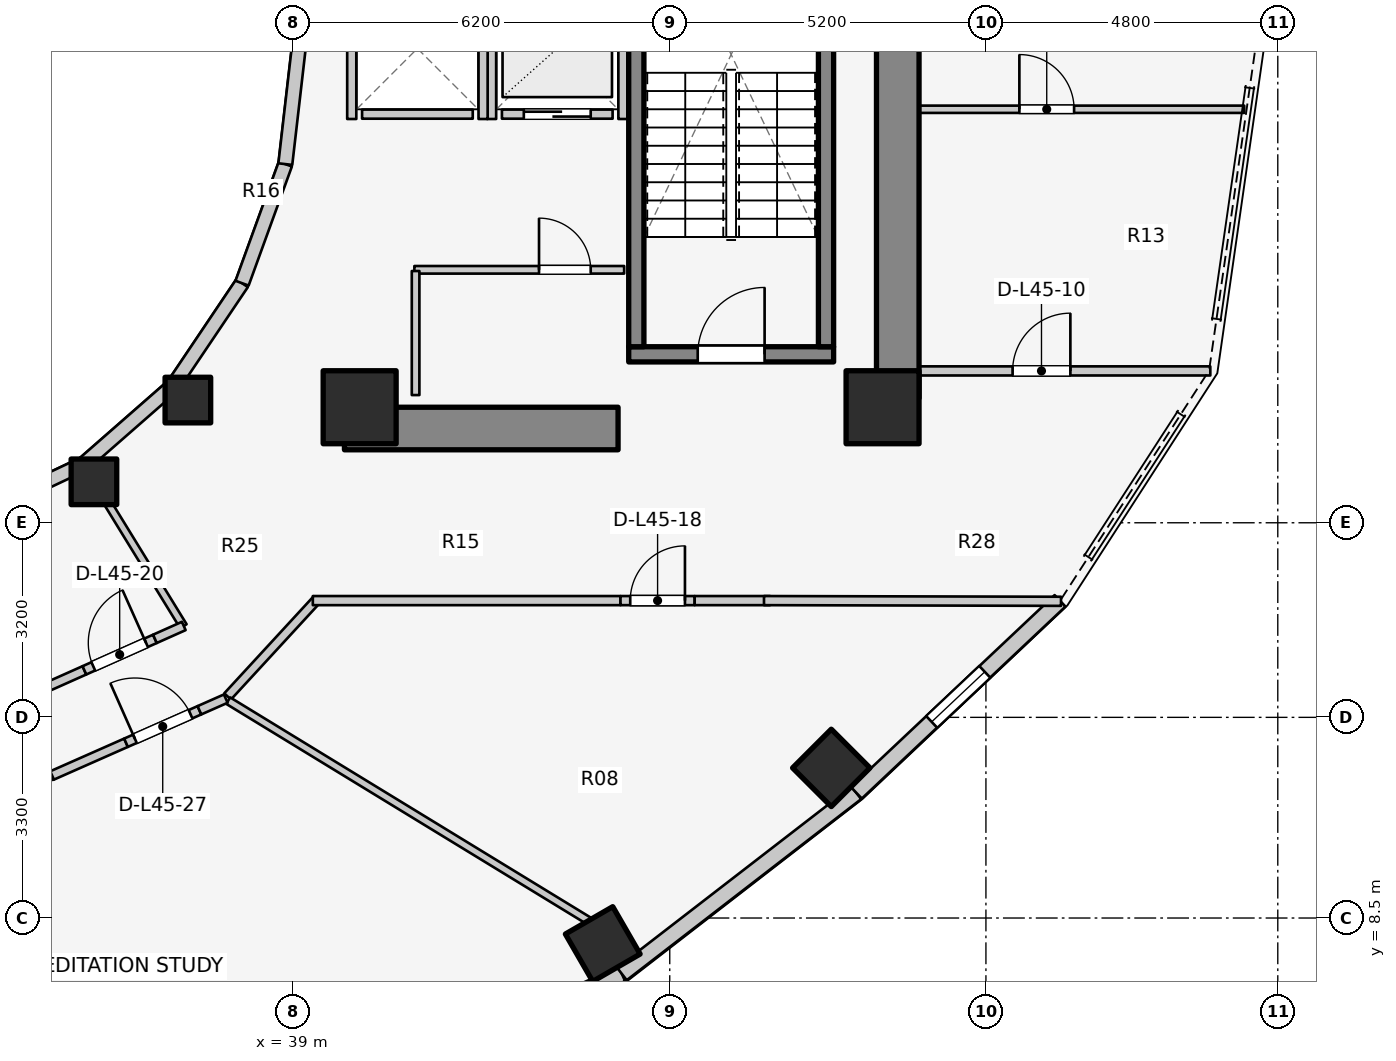
"""IFC4 building model, lengths in metres.
Left out: names, types, materials, properties, quantities, classifications, styles, units other than length and angle.
Written with IfcOpenShell. Run it as: python <this file> out.ifc"""

import sys

from ifc_helpers import new_model, si_unit, direction, frame, frame_2d, origin, origin_2d, place, context, subcontext, project, spatial, rectangle, extrude, element, fill, save


model = new_model("IFC4")
c1 = context("Model", 3, precision=1e-05, world=origin(), true_north=direction((0.0, 1.0)))
c2 = subcontext(c1, "Body", "Model", "MODEL_VIEW")
j1 = project(units=[si_unit("LENGTHUNIT", "METRE"), si_unit("PLANEANGLEUNIT", "RADIAN")], contexts=[c1])
p1 = place(None, origin())
s1 = spatial("IfcSite", under=j1, at=p1, CompositionType="ELEMENT")
p2 = place(p1, origin())
s2 = spatial("IfcBuilding", under=s1, at=p2, CompositionType="ELEMENT")
p3 = place(p2, frame((0.0, 0.0, 149.8)))
s3 = spatial("IfcBuildingStorey", under=s2, at=p3, CompositionType="ELEMENT", Elevation=149.8)
p4 = place(p3, frame((48.95, 17.05, 0.0), z_axis=(0.0, 0.0, 1.0), x_axis=(0.0, 1.0, 0.0)))
e1 = element("IfcWall", 1, at=p4, inside=s3, PredefinedType="SHEAR", context=c2, shape_type="SweptSolid", body=[
    extrude(rectangle(XDim=12.8, YDim=0.7, at=frame_2d((6.4, 0.0))), origin(), (0.0, 0.0, 1.0), 3.1),
])
p5 = place(p3, frame((39.85, 16.55, 0.0), z_axis=(0.0, 0.0, 1.0), x_axis=(1.0, 0.0, 0.0)))
e2 = element("IfcWall", 2, at=p5, inside=s3, PredefinedType="SHEAR", context=c2, shape_type="SweptSolid", body=[
    extrude(rectangle(XDim=4.5, YDim=0.7, at=frame_2d((2.25, 0.0))), origin(), (0.0, 0.0, 1.0), 3.1),
])
p6 = place(p3, frame((44.525, 17.77, 0.0), z_axis=(0.0, 0.0, 1.0), x_axis=(1.0, 0.0, 0.0)))
e3 = element("IfcWall", 3, at=p6, inside=s3, PredefinedType="SOLIDWALL", context=c2, shape_type="SweptSolid", body=[
    extrude(rectangle(XDim=3.37, YDim=0.25, at=frame_2d((1.685, 0.0))), origin(), (0.0, 0.0, 1.0), 3.1),
])
p7 = place(p6, frame((1.135, 0.0, 0.0)))
e4 = element("IfcOpeningElement", 4, at=p7, cuts=e3, PredefinedType="OPENING", context=c2, shape_type="SweptSolid", body=[
    extrude(rectangle(XDim=1.1, YDim=2.1, at=frame_2d((0.55, 1.05))), frame((0.0, 0.135, 0.0), z_axis=(0.0, -1.0, 0.0), x_axis=(1.0, 0.0, 0.0)), (0.0, 0.0, 1.0), 0.27),
])
for number, where, z_axis, x_axis in (
    (5, (44.65, 17.895, 0.0), (0.0, 0.0, 1.0), (0.0, 1.0, 0.0)),
    (6, (47.77, 17.895, 0.0), (0.0, 0.0, 1.0), (0.0, 1.0, 0.0)),
):
    element("IfcWall", number, at=place(p3, frame(where, z_axis=z_axis, x_axis=x_axis)), inside=s3, PredefinedType="SOLIDWALL", context=c2, shape_type="SweptSolid", body=[
        extrude(rectangle(XDim=7.81, YDim=0.25, at=frame_2d((3.905, 0.0))), origin(), (0.0, 0.0, 1.0), 3.1),
    ])
for number, where, z_axis, x_axis in (
    (7, (40.1, 16.9, 0.0), (0.0, 0.0, 1.0), (1.0, 0.0, 0.0)),
    (8, (48.7, 16.9, 0.0), (0.0, 0.0, 1.0), (1.0, 0.0, 0.0)),
):
    element("IfcColumn", number, at=place(p3, frame(where, z_axis=z_axis, x_axis=x_axis)), inside=s3, PredefinedType="COLUMN", context=c2, shape_type="SweptSolid", body=[
        extrude(rectangle(XDim=1.2, YDim=1.2, at=origin_2d()), origin(), (0.0, 0.0, 1.0), 3.1),
    ])
p8 = place(p3, frame((35.73, 15.673, 0.0), z_axis=(0.0, 0.0, 1.0), x_axis=(1.0, 0.0, 0.0)))
e9 = element("IfcColumn", 9, at=p8, inside=s3, PredefinedType="COLUMN", context=c2, shape_type="SweptSolid", body=[
    extrude(rectangle(XDim=0.75, YDim=0.75, at=origin_2d()), origin(), (0.0, 0.0, 1.0), 3.1),
])
p9 = place(p3, frame((44.098, 8.072, 0.0), z_axis=(0.0, 0.0, 1.0), x_axis=(0.5, -0.866025403784, 0.0)))
e10 = element("IfcColumn", 10, at=p9, inside=s3, PredefinedType="COLUMN", context=c2, shape_type="SweptSolid", body=[
    extrude(rectangle(XDim=0.9, YDim=0.9, at=origin_2d()), origin(), (0.0, 0.0, 1.0), 3.1),
])
p10 = place(p3, frame((37.275, 17.018, 0.0), z_axis=(0.0, 0.0, 1.0), x_axis=(1.0, 0.0, 0.0)))
e11 = element("IfcColumn", 11, at=p10, inside=s3, PredefinedType="COLUMN", context=c2, shape_type="SweptSolid", body=[
    extrude(rectangle(XDim=0.75, YDim=0.75, at=origin_2d()), origin(), (0.0, 0.0, 1.0), 3.1),
])
p11 = place(p3, frame((47.857, 10.969, 0.0), z_axis=(0.0, 0.0, 1.0), x_axis=(0.707106781187, -0.707106781187, 0.0)))
e12 = element("IfcColumn", 12, at=p11, inside=s3, PredefinedType="COLUMN", context=c2, shape_type="SweptSolid", body=[
    extrude(rectangle(XDim=0.9, YDim=0.9, at=origin_2d()), origin(), (0.0, 0.0, 1.0), 3.1),
])
p12 = place(p3, frame((33.843, 15.157, 0.0), z_axis=(0.0, 0.0, 1.0), x_axis=(0.904179699603, 0.427152280606, 0.0)))
e13 = element("IfcWall", 13, at=p12, inside=s3, PredefinedType="STANDARD", context=c2, shape_type="SweptSolid", body=[
    extrude(rectangle(XDim=1.899, YDim=0.23, at=frame_2d((0.95, 0.0))), origin(), (0.0, 0.0, 1.0), 1.22),
])
p13 = place(p3, frame((35.56, 15.968, 0.0), z_axis=(0.0, 0.0, 1.0), x_axis=(0.752576694707, 0.658504607869, 0.0)))
e14 = element("IfcWall", 14, at=p13, inside=s3, PredefinedType="STANDARD", context=c2, shape_type="SweptSolid", body=[
    extrude(rectangle(XDim=1.959, YDim=0.23, at=frame_2d((0.98, 0.0))), origin(), (0.0, 0.0, 1.0), 1.22),
])
p14 = place(p3, frame((37.035, 17.258, 0.0), z_axis=(0.0, 0.0, 1.0), x_axis=(0.558197800898, 0.829707909492, 0.0)))
e15 = element("IfcWall", 15, at=p14, inside=s3, PredefinedType="STANDARD", context=c2, shape_type="SweptSolid", body=[
    extrude(rectangle(XDim=2.027, YDim=0.23, at=frame_2d((1.013, 0.0))), origin(), (0.0, 0.0, 1.0), 1.22),
])
p15 = place(p3, frame((38.166, 18.94, 0.0), z_axis=(0.0, 0.0, 1.0), x_axis=(0.341423187295, 0.93990968033, 0.0)))
e16 = element("IfcWall", 16, at=p15, inside=s3, PredefinedType="STANDARD", context=c2, shape_type="SweptSolid", body=[
    extrude(rectangle(XDim=2.084, YDim=0.23, at=frame_2d((1.042, 0.0))), origin(), (0.0, 0.0, 1.0), 2.56),
])
p16 = place(p3, frame((38.877, 20.898, 0.0), z_axis=(0.0, 0.0, 1.0), x_axis=(0.114711713601, 0.993398823617, 0.0)))
e17 = element("IfcWall", 17, at=p16, inside=s3, PredefinedType="STANDARD", context=c2, shape_type="SweptSolid", body=[
    extrude(rectangle(XDim=2.115, YDim=0.23, at=frame_2d((1.058, 0.0))), origin(), (0.0, 0.0, 1.0), 2.56),
])
p17 = place(p3, frame((39.365, 5.315, 0.0), z_axis=(0.0, 0.0, 1.0), x_axis=(0.912353637112, 0.409403029847, 0.0)))
e18 = element("IfcWall", 18, at=p17, inside=s3, PredefinedType="STANDARD", context=c2, shape_type="SweptSolid", body=[
    extrude(rectangle(XDim=5.533, YDim=0.26, at=frame_2d((2.766, 0.0))), origin(), (0.0, 0.0, 1.0), 1.22),
])
p18 = place(p17, frame((2.167, 0.0, 0.15)))
e19 = element("IfcOpeningElement", 19, at=p18, cuts=e18, PredefinedType="OPENING", context=c2, shape_type="SweptSolid", body=[
    extrude(rectangle(XDim=1.2, YDim=0.9, at=frame_2d((0.6, 0.45))), frame((0.0, 0.14, 0.0), z_axis=(0.0, -1.0, 0.0), x_axis=(1.0, 0.0, 0.0)), (0.0, 0.0, 1.0), 0.28),
])
p19 = place(p3, frame((44.413, 7.581, 0.0), z_axis=(0.0, 0.0, 1.0), x_axis=(0.791460185804, 0.611220724687, 0.0)))
e20 = element("IfcWall", 20, at=p19, inside=s3, PredefinedType="STANDARD", context=c2, shape_type="SweptSolid", body=[
    extrude(rectangle(XDim=4.872, YDim=0.26, at=frame_2d((2.436, 0.0))), origin(), (0.0, 0.0, 1.0), 1.22),
])
p20 = place(p3, frame((48.269, 10.559, 0.0), z_axis=(0.0, 0.0, 1.0), x_axis=(0.727667301037, 0.68593024354, 0.0)))
e21 = element("IfcWall", 21, at=p20, inside=s3, PredefinedType="STANDARD", context=c2, shape_type="SweptSolid", body=[
    extrude(rectangle(XDim=4.604, YDim=0.26, at=frame_2d((2.302, 0.0))), origin(), (0.0, 0.0, 1.0), 1.22),
])
p21 = place(p20, frame((1.702, 0.0, 0.15)))
e22 = element("IfcOpeningElement", 22, at=p21, cuts=e21, PredefinedType="OPENING", context=c2, shape_type="SweptSolid", body=[
    extrude(rectangle(XDim=1.2, YDim=0.9, at=frame_2d((0.6, 0.45))), frame((0.0, 0.14, 0.0), z_axis=(0.0, -1.0, 0.0), x_axis=(1.0, 0.0, 0.0)), (0.0, 0.0, 1.0), 0.28),
])
p22 = place(p3, frame((42.44, 21.72, 0.0), z_axis=(0.0, 0.0, 1.0), x_axis=(1.0, 0.0, 0.0)))
e23 = element("IfcWall", 23, at=p22, inside=s3, PredefinedType="SOLIDWALL", context=c2, shape_type="SweptSolid", body=[
    extrude(rectangle(XDim=1.82, YDim=0.15, at=frame_2d((0.91, 0.0))), origin(), (0.0, 0.0, 1.0), 2.575),
])
p23 = place(p22, frame((0.36, 0.0, 0.0)))
e24 = element("IfcOpeningElement", 24, at=p23, cuts=e23, PredefinedType="OPENING", context=c2, shape_type="SweptSolid", body=[
    extrude(rectangle(XDim=1.1, YDim=2.1, at=frame_2d((0.55, 1.05))), frame((0.0, 0.085, 0.0), z_axis=(0.0, -1.0, 0.0), x_axis=(1.0, 0.0, 0.0)), (0.0, 0.0, 1.0), 0.17),
])
for number, where, z_axis, x_axis in (
    (25, (42.27, 21.64, 0.0), (0.0, 0.0, 1.0), (0.0, 1.0, 0.0)),
    (26, (44.43, 21.64, 0.0), (0.0, 0.0, 1.0), (0.0, 1.0, 0.0)),
):
    element("IfcWall", number, at=place(p3, frame(where, z_axis=z_axis, x_axis=x_axis)), inside=s3, PredefinedType="SOLIDWALL", context=c2, shape_type="SweptSolid", body=[
        extrude(rectangle(XDim=2.32, YDim=0.15, at=frame_2d((1.16, 0.0))), origin(), (0.0, 0.0, 1.0), 2.575),
    ])
p24 = place(p3, frame((40.14, 21.72, 0.0), z_axis=(0.0, 0.0, 1.0), x_axis=(1.0, 0.0, 0.0)))
e27 = element("IfcWall", 27, at=p24, inside=s3, PredefinedType="SOLIDWALL", context=c2, shape_type="SweptSolid", body=[
    extrude(rectangle(XDim=1.82, YDim=0.15, at=frame_2d((0.91, 0.0))), origin(), (0.0, 0.0, 1.0), 2.12),
])
p25 = place(p3, frame((39.97, 21.64, 0.0), z_axis=(0.0, 0.0, 1.0), x_axis=(0.0, 1.0, 0.0)))
e28 = element("IfcWall", 28, at=p25, inside=s3, PredefinedType="SOLIDWALL", context=c2, shape_type="SweptSolid", body=[
    extrude(rectangle(XDim=2.32, YDim=0.15, at=frame_2d((1.16, 0.0))), origin(), (0.0, 0.0, 1.0), 2.12),
])
p26 = place(p3, frame((42.13, 21.64, 0.0), z_axis=(0.0, 0.0, 1.0), x_axis=(0.0, 1.0, 0.0)))
e29 = element("IfcWall", 29, at=p26, inside=s3, PredefinedType="SOLIDWALL", context=c2, shape_type="SweptSolid", body=[
    extrude(rectangle(XDim=2.32, YDim=0.15, at=frame_2d((1.16, 0.0))), origin(), (0.0, 0.0, 1.0), 2.575),
])
p27 = place(p3, frame((41.0, 19.16, 0.0), z_axis=(0.0, 0.0, 1.0), x_axis=(1.0, 0.0, 0.0)))
e30 = element("IfcWall", 30, at=p27, inside=s3, PredefinedType="PARTITIONING", context=c2, shape_type="SweptSolid", body=[
    extrude(rectangle(XDim=3.45, YDim=0.125, at=frame_2d((1.725, 0.0))), origin(), (0.0, 0.0, 1.0), 2.12),
])
p28 = place(p27, frame((2.05, 0.0, 0.0)))
e31 = element("IfcOpeningElement", 31, at=p28, cuts=e30, PredefinedType="OPENING", context=c2, shape_type="SweptSolid", body=[
    extrude(rectangle(XDim=0.85, YDim=2.05, at=frame_2d((0.425, 1.025))), frame((0.0, 0.073, 0.0), z_axis=(0.0, -1.0, 0.0), x_axis=(1.0, 0.0, 0.0)), (0.0, 0.0, 1.0), 0.145),
])
p29 = place(p3, frame((41.02, 17.1, 0.0), z_axis=(0.0, 0.0, 1.0), x_axis=(0.0, 1.0, 0.0)))
e32 = element("IfcWall", 32, at=p29, inside=s3, PredefinedType="PARTITIONING", context=c2, shape_type="SweptSolid", body=[
    extrude(rectangle(XDim=2.04, YDim=0.125, at=frame_2d((1.02, 0.0))), origin(), (0.0, 0.0, 1.0), 2.575),
])
p30 = place(p3, frame((48.95, 17.497, 0.0), z_axis=(0.0, 0.0, 1.0), x_axis=(1.0, 0.0, 0.0)))
e33 = element("IfcWall", 33, at=p30, inside=s3, PredefinedType="PARTITIONING", context=c2, shape_type="SweptSolid", body=[
    extrude(rectangle(XDim=5.14, YDim=0.15, at=frame_2d((2.57, 0.0))), origin(), (0.0, 0.0, 1.0), 2.575),
])
p31 = place(p30, frame((1.889, 0.0, 0.0)))
e34 = element("IfcOpeningElement", 34, at=p31, cuts=e33, PredefinedType="OPENING", context=c2, shape_type="SweptSolid", body=[
    extrude(rectangle(XDim=0.95, YDim=2.1, at=frame_2d((0.475, 1.05))), frame((0.0, 0.085, 0.0), z_axis=(0.0, -1.0, 0.0), x_axis=(1.0, 0.0, 0.0)), (0.0, 0.0, 1.0), 0.17),
])
p32 = place(p3, frame((48.95, 21.8, 0.0), z_axis=(0.0, 0.0, 1.0), x_axis=(1.0, 0.0, 0.0)))
e35 = element("IfcWall", 35, at=p32, inside=s3, PredefinedType="MOVABLE", context=c2, shape_type="SweptSolid", body=[
    extrude(rectangle(XDim=5.698, YDim=0.12, at=frame_2d((2.849, 0.0))), origin(), (0.0, 0.0, 1.0), 2.575),
])
p33 = place(p32, frame((2.0, 0.0, 0.0)))
e36 = element("IfcOpeningElement", 36, at=p33, cuts=e35, PredefinedType="OPENING", context=c2, shape_type="SweptSolid", body=[
    extrude(rectangle(XDim=0.9, YDim=2.1, at=frame_2d((0.45, 1.05))), frame((0.0, 0.07, 0.0), z_axis=(0.0, -1.0, 0.0), x_axis=(1.0, 0.0, 0.0)), (0.0, 0.0, 1.0), 0.14),
])
p34 = place(p3, frame((37.928, 12.144, 0.0), z_axis=(0.0, 0.0, 1.0), x_axis=(0.677579737957, 0.735449317567, 0.0)))
e37 = element("IfcWall", 37, at=p34, inside=s3, PredefinedType="PARTITIONING", context=c2, shape_type="SweptSolid", body=[
    extrude(rectangle(XDim=2.173, YDim=0.15, at=frame_2d((1.086, 0.0))), origin(), (0.0, 0.0, 1.0), 1.22),
])
p35 = place(p3, frame((39.33, 13.72, 0.0), z_axis=(0.0, 0.0, 1.0), x_axis=(1.0, 0.0, 0.0)))
e38 = element("IfcWall", 38, at=p35, inside=s3, PredefinedType="PARTITIONING", context=c2, shape_type="SweptSolid", body=[
    extrude(rectangle(XDim=5.06, YDim=0.15, at=frame_2d((2.53, 0.0))), origin(), (0.0, 0.0, 1.0), 1.22),
])
p36 = place(p3, frame((44.39, 13.72, 0.0), z_axis=(0.0, 0.0, 1.0), x_axis=(1.0, 0.0, 0.0)))
e39 = element("IfcWall", 39, at=p36, inside=s3, PredefinedType="PARTITIONING", context=c2, shape_type="SweptSolid", body=[
    extrude(rectangle(XDim=1.22, YDim=0.15, at=frame_2d((0.61, 0.0))), origin(), (0.0, 0.0, 1.0), 2.575),
])
p37 = place(p36, frame((0.16, 0.0, 0.0)))
e40 = element("IfcOpeningElement", 40, at=p37, cuts=e39, PredefinedType="OPENING", context=c2, shape_type="SweptSolid", body=[
    extrude(rectangle(XDim=0.9, YDim=2.1, at=frame_2d((0.45, 1.05))), frame((0.0, 0.085, 0.0), z_axis=(0.0, -1.0, 0.0), x_axis=(1.0, 0.0, 0.0)), (0.0, 0.0, 1.0), 0.17),
])
p38 = place(p3, frame((45.61, 13.72, 0.0), z_axis=(0.0, 0.0, 1.0), x_axis=(1.0, 0.0, 0.0)))
e41 = element("IfcWall", 41, at=p38, inside=s3, PredefinedType="PARTITIONING", context=c2, shape_type="SweptSolid", body=[
    extrude(rectangle(XDim=1.24, YDim=0.15, at=frame_2d((0.62, 0.0))), origin(), (0.0, 0.0, 1.0), 2.575),
])
p39 = place(p3, frame((46.75, 13.72, 0.0), z_axis=(0.0, 0.0, 1.0), x_axis=(0.999997122315, -0.00239903348, 0.0)))
e42 = element("IfcWall", 42, at=p39, inside=s3, PredefinedType="PARTITIONING", context=c2, shape_type="SweptSolid", body=[
    extrude(rectangle(XDim=4.885, YDim=0.15, at=frame_2d((2.442, 0.0))), origin(), (0.0, 0.0, 1.0), 1.22),
])
p40 = place(p3, frame((35.55, 15.985, 0.0), z_axis=(0.0, 0.0, 1.0), x_axis=(0.523587550846, -0.851971875474, 0.0)))
e43 = element("IfcWall", 43, at=p40, inside=s3, PredefinedType="PARTITIONING", context=c2, shape_type="SweptSolid", body=[
    extrude(rectangle(XDim=3.153, YDim=0.125, at=frame_2d((1.577, 0.0))), origin(), (0.0, 0.0, 1.0), 1.22),
])
p41 = place(p3, frame((34.69, 12.179, 0.0), z_axis=(0.0, 0.0, 1.0), x_axis=(0.913164738684, 0.407590677057, 0.0)))
e44 = element("IfcWall", 44, at=p41, inside=s3, PredefinedType="PARTITIONING", context=c2, shape_type="SweptSolid", body=[
    extrude(rectangle(XDim=0.967, YDim=0.15, at=frame_2d((0.483, 0.0))), origin(), (0.0, 0.0, 1.0), 1.22),
])
p42 = place(p3, frame((35.573, 12.573, 0.0), z_axis=(0.0, 0.0, 1.0), x_axis=(0.913104656548, 0.407725258219, 0.0)))
e45 = element("IfcWall", 45, at=p42, inside=s3, PredefinedType="PARTITIONING", context=c2, shape_type="SweptSolid", body=[
    extrude(rectangle(XDim=1.27, YDim=0.15, at=frame_2d((0.635, 0.0))), origin(), (0.0, 0.0, 1.0), 2.16),
])
p43 = place(p42, frame((0.16, 0.0, 0.0)))
e46 = element("IfcOpeningElement", 46, at=p43, cuts=e45, PredefinedType="OPENING", context=c2, shape_type="SweptSolid", body=[
    extrude(rectangle(XDim=0.95, YDim=2.1, at=frame_2d((0.475, 1.05))), frame((0.0, 0.085, 0.0), z_axis=(0.0, -1.0, 0.0), x_axis=(1.0, 0.0, 0.0)), (0.0, 0.0, 1.0), 0.17),
])
p44 = place(p3, frame((36.733, 13.091, 0.0), z_axis=(0.0, 0.0, 1.0), x_axis=(0.913209724119, 0.407489876897, 0.0)))
e47 = element("IfcWall", 47, at=p44, inside=s3, PredefinedType="PARTITIONING", context=c2, shape_type="SweptSolid", body=[
    extrude(rectangle(XDim=0.52, YDim=0.15, at=frame_2d((0.26, 0.0))), origin(), (0.0, 0.0, 1.0), 2.575),
])
p45 = place(p3, frame((37.938, 12.075, 0.0), z_axis=(0.0, 0.0, 1.0), x_axis=(0.853440334679, -0.521190555501, 0.0)))
e48 = element("IfcWall", 48, at=p45, inside=s3, PredefinedType="PARTITIONING", context=c2, shape_type="SweptSolid", body=[
    extrude(rectangle(XDim=6.966, YDim=0.125, at=frame_2d((3.483, 0.0))), origin(), (0.0, 0.0, 1.0), 1.22),
])
p46 = place(p3, frame((31.992, 10.418, 0.0), z_axis=(0.0, 0.0, 1.0), x_axis=(0.990254709652, 0.13926812274, 0.0)))
e49 = element("IfcWall", 49, at=p46, inside=s3, PredefinedType="PARTITIONING", context=c2, shape_type="SweptSolid", body=[
    extrude(rectangle(XDim=3.096, YDim=0.15, at=frame_2d((1.548, 0.0))), origin(), (0.0, 0.0, 1.0), 1.22),
])
p47 = place(p3, frame((35.042, 10.844, 0.0), z_axis=(0.0, 0.0, 1.0), x_axis=(0.91450660596, 0.40457096739, 0.0)))
e50 = element("IfcWall", 50, at=p47, inside=s3, PredefinedType="PARTITIONING", context=c2, shape_type="SweptSolid", body=[
    extrude(rectangle(XDim=1.33, YDim=0.15, at=frame_2d((0.665, 0.0))), origin(), (0.0, 0.0, 1.0), 1.22),
])
p48 = place(p3, frame((36.258, 11.383, 0.0), z_axis=(0.0, 0.0, 1.0), x_axis=(0.914519545761, 0.404541716541, 0.0)))
e51 = element("IfcWall", 51, at=p48, inside=s3, PredefinedType="PARTITIONING", context=c2, shape_type="SweptSolid", body=[
    extrude(rectangle(XDim=1.32, YDim=0.15, at=frame_2d((0.66, 0.0))), origin(), (0.0, 0.0, 1.0), 2.16),
])
p49 = place(p48, frame((0.16, 0.0, 0.0)))
e52 = element("IfcOpeningElement", 52, at=p49, cuts=e51, PredefinedType="OPENING", context=c2, shape_type="SweptSolid", body=[
    extrude(rectangle(XDim=1.0, YDim=2.1, at=frame_2d((0.5, 1.05))), frame((0.0, 0.085, 0.0), z_axis=(0.0, -1.0, 0.0), x_axis=(1.0, 0.0, 0.0)), (0.0, 0.0, 1.0), 0.17),
])
p50 = place(p3, frame((37.465, 11.917, 0.0), z_axis=(0.0, 0.0, 1.0), x_axis=(0.914553664309, 0.4044645783, 0.0)))
e53 = element("IfcWall", 53, at=p50, inside=s3, PredefinedType="PARTITIONING", context=c2, shape_type="SweptSolid", body=[
    extrude(rectangle(XDim=0.474, YDim=0.15, at=frame_2d((0.237, 0.0))), origin(), (0.0, 0.0, 1.0), 2.575),
])
p51 = place(p21, origin())
e54 = element("IfcWindow", 54, at=p51, inside=s3, PartitioningType="SINGLE_PANEL", PredefinedType="WINDOW", context=c2, shape_type="SweptSolid", body=[
    extrude(rectangle(XDim=1.2, YDim=0.9, at=frame_2d((0.6, 0.45))), frame((0.0, 0.03, 0.0), z_axis=(0.0, -1.0, 0.0), x_axis=(1.0, 0.0, 0.0)), (0.0, 0.0, 1.0), 0.06),
])
fill(e22, e54)
p52 = place(p7, origin())
e55 = element("IfcDoor", 55, at=p52, inside=s3, OperationType="SINGLE_SWING_RIGHT", PredefinedType="DOOR", context=c2, shape_type="SweptSolid", body=[
    extrude(rectangle(XDim=1.1, YDim=2.1, at=frame_2d((0.55, 1.05))), frame((0.0, 0.025, 0.0), z_axis=(0.0, -1.0, 0.0), x_axis=(1.0, 0.0, 0.0)), (0.0, 0.0, 1.0), 0.05),
])
fill(e4, e55)
p53 = place(p23, origin())
e56 = element("IfcDoor", 56, at=p53, inside=s3, OperationType="DOUBLE_DOOR_SLIDING", PredefinedType="DOOR", context=c2, shape_type="SweptSolid", body=[
    extrude(rectangle(XDim=1.1, YDim=2.1, at=frame_2d((0.55, 1.05))), frame((0.0, 0.025, 0.0), z_axis=(0.0, -1.0, 0.0), x_axis=(1.0, 0.0, 0.0)), (0.0, 0.0, 1.0), 0.05),
])
fill(e24, e56)
p54 = place(p28, origin())
e57 = element("IfcDoor", 57, at=p54, inside=s3, OperationType="SINGLE_SWING_LEFT", PredefinedType="DOOR", context=c2, shape_type="SweptSolid", body=[
    extrude(rectangle(XDim=0.85, YDim=2.05, at=frame_2d((0.425, 1.025))), frame((0.0, 0.025, 0.0), z_axis=(0.0, -1.0, 0.0), x_axis=(1.0, 0.0, 0.0)), (0.0, 0.0, 1.0), 0.05),
])
fill(e31, e57)
p55 = place(p31, origin())
e58 = element("IfcDoor", 58, at=p55, inside=s3, OperationType="SINGLE_SWING_RIGHT", PredefinedType="DOOR", context=c2, shape_type="SweptSolid", body=[
    extrude(rectangle(XDim=0.95, YDim=2.1, at=frame_2d((0.475, 1.05))), frame((0.0, 0.025, 0.0), z_axis=(0.0, -1.0, 0.0), x_axis=(1.0, 0.0, 0.0)), (0.0, 0.0, 1.0), 0.05),
])
fill(e34, e58)
p56 = place(p33, origin())
e59 = element("IfcDoor", 59, at=p56, inside=s3, OperationType="SINGLE_SWING_LEFT", PredefinedType="DOOR", context=c2, shape_type="SweptSolid", body=[
    extrude(rectangle(XDim=0.9, YDim=2.1, at=frame_2d((0.45, 1.05))), frame((0.0, 0.025, 0.0), z_axis=(0.0, -1.0, 0.0), x_axis=(1.0, 0.0, 0.0)), (0.0, 0.0, 1.0), 0.05),
])
fill(e36, e59)
p57 = place(p37, origin())
e60 = element("IfcDoor", 60, at=p57, inside=s3, OperationType="SINGLE_SWING_RIGHT", PredefinedType="DOOR", context=c2, shape_type="SweptSolid", body=[
    extrude(rectangle(XDim=0.9, YDim=2.1, at=frame_2d((0.45, 1.05))), frame((0.0, 0.025, 0.0), z_axis=(0.0, -1.0, 0.0), x_axis=(1.0, 0.0, 0.0)), (0.0, 0.0, 1.0), 0.05),
])
fill(e40, e60)
p58 = place(p43, origin())
e61 = element("IfcDoor", 61, at=p58, inside=s3, OperationType="SINGLE_SWING_RIGHT", PredefinedType="DOOR", context=c2, shape_type="SweptSolid", body=[
    extrude(rectangle(XDim=0.95, YDim=2.1, at=frame_2d((0.475, 1.05))), frame((0.0, 0.025, 0.0), z_axis=(0.0, -1.0, 0.0), x_axis=(1.0, 0.0, 0.0)), (0.0, 0.0, 1.0), 0.05),
])
fill(e46, e61)
p59 = place(p49, origin())
e62 = element("IfcDoor", 62, at=p59, inside=s3, OperationType="SINGLE_SWING_LEFT", PredefinedType="DOOR", context=c2, shape_type="SweptSolid", body=[
    extrude(rectangle(XDim=1.0, YDim=2.1, at=frame_2d((0.5, 1.05))), frame((0.0, 0.025, 0.0), z_axis=(0.0, -1.0, 0.0), x_axis=(1.0, 0.0, 0.0)), (0.0, 0.0, 1.0), 0.05),
])
fill(e52, e62)
save(model, sys.argv[1])
